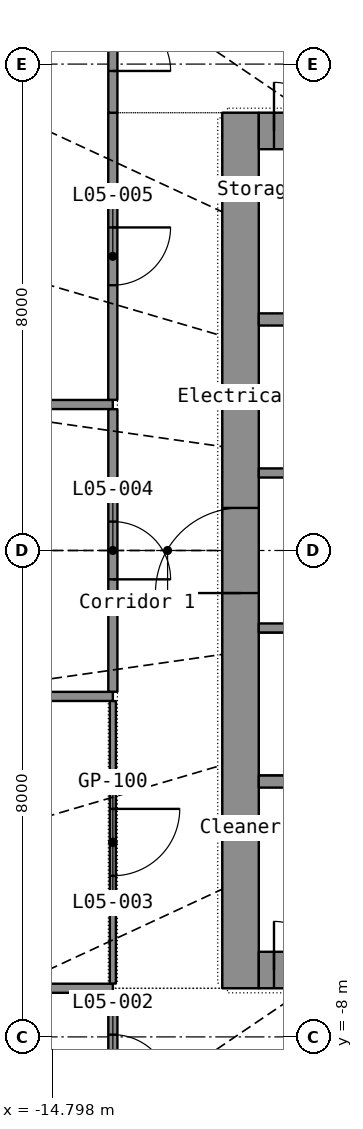
"""IFC4 building model, lengths in metres.
Left out: names, types, materials, properties, quantities, classifications, styles, units other than length and angle.
Written with IfcOpenShell. Run it as: python <this file> out.ifc"""

import sys

from ifc_helpers import new_model, si_unit, direction, frame, frame_2d, origin, place, context, subcontext, project, spatial, rectangle, extrude, element, fill, save


model = new_model("IFC4")
c1 = context("Model", 3, precision=1e-05, world=origin(), true_north=direction((0.0, 1.0)))
c2 = subcontext(c1, "Body", "Model", "MODEL_VIEW")
j1 = project(units=[si_unit("LENGTHUNIT", "METRE"), si_unit("PLANEANGLEUNIT", "RADIAN")], contexts=[c1])
p1 = place(None, origin())
s1 = spatial("IfcSite", under=j1, at=p1, CompositionType="ELEMENT")
p2 = place(p1, origin())
s2 = spatial("IfcBuilding", under=s1, at=p2, CompositionType="ELEMENT")
p3 = place(p2, frame((0.0, 0.0, 28.7)))
s3 = spatial("IfcBuildingStorey", under=s2, at=p3, CompositionType="ELEMENT", Elevation=28.7)
p4 = place(p3, frame((-11.7, -7.2, 0.0), z_axis=(0.0, 0.0, 1.0), x_axis=(0.0, 1.0, 0.0)))
e1 = element("IfcWall", 1, at=p4, inside=s3, PredefinedType="SHEAR", context=c2, shape_type="SweptSolid", body=[
    extrude(rectangle(XDim=14.4, YDim=0.6, at=frame_2d((7.2, 0.0))), origin(), (0.0, 0.0, 1.0), 3.8),
])
p5 = place(p4, frame((6.5, 0.0, 0.0)))
e2 = element("IfcOpeningElement", 2, at=p5, cuts=e1, PredefinedType="OPENING", context=c2, shape_type="SweptSolid", body=[
    extrude(rectangle(XDim=1.4, YDim=2.2, at=frame_2d((0.7, 1.1))), frame((0.0, 0.31, 0.0), z_axis=(0.0, -1.0, 0.0), x_axis=(1.0, 0.0, 0.0)), (0.0, 0.0, 1.0), 0.62),
])
p6 = place(p3, frame((-11.4, -6.9, 0.0), z_axis=(0.0, 0.0, 1.0), x_axis=(1.0, 0.0, 0.0)))
e3 = element("IfcWall", 3, at=p6, inside=s3, PredefinedType="SHEAR", context=c2, shape_type="SweptSolid", body=[
    extrude(rectangle(XDim=22.8, YDim=0.6, at=frame_2d((11.4, 0.0))), origin(), (0.0, 0.0, 1.0), 3.8),
])
p7 = place(p6, frame((1.85, 0.0, 0.0)))
e4 = element("IfcOpeningElement", 4, at=p7, cuts=e3, PredefinedType="OPENING", context=c2, shape_type="SweptSolid", body=[
    extrude(rectangle(XDim=1.1, YDim=2.2, at=frame_2d((0.55, 1.1))), frame((0.0, 0.31, 0.0), z_axis=(0.0, -1.0, 0.0), x_axis=(1.0, 0.0, 0.0)), (0.0, 0.0, 1.0), 0.62),
])
p8 = place(p6, frame((3.85, 0.0, 0.0)))
e5 = element("IfcOpeningElement", 5, at=p8, cuts=e3, PredefinedType="OPENING", context=c2, shape_type="SweptSolid", body=[
    extrude(rectangle(XDim=1.1, YDim=2.2, at=frame_2d((0.55, 1.1))), frame((0.0, 0.31, 0.0), z_axis=(0.0, -1.0, 0.0), x_axis=(1.0, 0.0, 0.0)), (0.0, 0.0, 1.0), 0.62),
])
p9 = place(p6, frame((5.85, 0.0, 0.0)))
e6 = element("IfcOpeningElement", 6, at=p9, cuts=e3, PredefinedType="OPENING", context=c2, shape_type="SweptSolid", body=[
    extrude(rectangle(XDim=1.1, YDim=2.2, at=frame_2d((0.55, 1.1))), frame((0.0, 0.31, 0.0), z_axis=(0.0, -1.0, 0.0), x_axis=(1.0, 0.0, 0.0)), (0.0, 0.0, 1.0), 0.62),
])
p10 = place(p6, frame((7.85, 0.0, 0.0)))
e7 = element("IfcOpeningElement", 7, at=p10, cuts=e3, PredefinedType="OPENING", context=c2, shape_type="SweptSolid", body=[
    extrude(rectangle(XDim=1.1, YDim=2.2, at=frame_2d((0.55, 1.1))), frame((0.0, 0.31, 0.0), z_axis=(0.0, -1.0, 0.0), x_axis=(1.0, 0.0, 0.0)), (0.0, 0.0, 1.0), 0.62),
])
p11 = place(p6, frame((9.85, 0.0, 0.0)))
e8 = element("IfcOpeningElement", 8, at=p11, cuts=e3, PredefinedType="OPENING", context=c2, shape_type="SweptSolid", body=[
    extrude(rectangle(XDim=1.1, YDim=2.2, at=frame_2d((0.55, 1.1))), frame((0.0, 0.31, 0.0), z_axis=(0.0, -1.0, 0.0), x_axis=(1.0, 0.0, 0.0)), (0.0, 0.0, 1.0), 0.62),
])
p12 = place(p6, frame((11.85, 0.0, 0.0)))
e9 = element("IfcOpeningElement", 9, at=p12, cuts=e3, PredefinedType="OPENING", context=c2, shape_type="SweptSolid", body=[
    extrude(rectangle(XDim=1.1, YDim=2.2, at=frame_2d((0.55, 1.1))), frame((0.0, 0.31, 0.0), z_axis=(0.0, -1.0, 0.0), x_axis=(1.0, 0.0, 0.0)), (0.0, 0.0, 1.0), 0.62),
])
p13 = place(p6, frame((13.85, 0.0, 0.0)))
e10 = element("IfcOpeningElement", 10, at=p13, cuts=e3, PredefinedType="OPENING", context=c2, shape_type="SweptSolid", body=[
    extrude(rectangle(XDim=1.1, YDim=2.2, at=frame_2d((0.55, 1.1))), frame((0.0, 0.31, 0.0), z_axis=(0.0, -1.0, 0.0), x_axis=(1.0, 0.0, 0.0)), (0.0, 0.0, 1.0), 0.62),
])
p14 = place(p6, frame((15.85, 0.0, 0.0)))
e11 = element("IfcOpeningElement", 11, at=p14, cuts=e3, PredefinedType="OPENING", context=c2, shape_type="SweptSolid", body=[
    extrude(rectangle(XDim=1.1, YDim=2.2, at=frame_2d((0.55, 1.1))), frame((0.0, 0.31, 0.0), z_axis=(0.0, -1.0, 0.0), x_axis=(1.0, 0.0, 0.0)), (0.0, 0.0, 1.0), 0.62),
])
p15 = place(p6, frame((19.85, 0.0, 0.0)))
e12 = element("IfcOpeningElement", 12, at=p15, cuts=e3, PredefinedType="OPENING", context=c2, shape_type="SweptSolid", body=[
    extrude(rectangle(XDim=1.1, YDim=2.2, at=frame_2d((0.55, 1.1))), frame((0.0, 0.31, 0.0), z_axis=(0.0, -1.0, 0.0), x_axis=(1.0, 0.0, 0.0)), (0.0, 0.0, 1.0), 0.62),
])
p16 = place(p6, frame((0.25, 0.0, 0.0)))
e13 = element("IfcOpeningElement", 13, at=p16, cuts=e3, PredefinedType="OPENING", context=c2, shape_type="SweptSolid", body=[
    extrude(rectangle(XDim=0.8, YDim=2.05, at=frame_2d((0.4, 1.025))), frame((0.0, 0.31, 0.0), z_axis=(0.0, -1.0, 0.0), x_axis=(1.0, 0.0, 0.0)), (0.0, 0.0, 1.0), 0.62),
])
p17 = place(p6, frame((21.75, 0.0, 0.0)))
e14 = element("IfcOpeningElement", 14, at=p17, cuts=e3, PredefinedType="OPENING", context=c2, shape_type="SweptSolid", body=[
    extrude(rectangle(XDim=0.8, YDim=2.05, at=frame_2d((0.4, 1.025))), frame((0.0, 0.31, 0.0), z_axis=(0.0, -1.0, 0.0), x_axis=(1.0, 0.0, 0.0)), (0.0, 0.0, 1.0), 0.62),
])
p18 = place(p3, frame((-11.4, 6.9, 0.0), z_axis=(0.0, 0.0, 1.0), x_axis=(1.0, 0.0, 0.0)))
e15 = element("IfcWall", 15, at=p18, inside=s3, PredefinedType="SHEAR", context=c2, shape_type="SweptSolid", body=[
    extrude(rectangle(XDim=22.8, YDim=0.6, at=frame_2d((11.4, 0.0))), origin(), (0.0, 0.0, 1.0), 3.8),
])
p19 = place(p18, frame((1.85, 0.0, 0.0)))
e16 = element("IfcOpeningElement", 16, at=p19, cuts=e15, PredefinedType="OPENING", context=c2, shape_type="SweptSolid", body=[
    extrude(rectangle(XDim=1.1, YDim=2.2, at=frame_2d((0.55, 1.1))), frame((0.0, 0.31, 0.0), z_axis=(0.0, -1.0, 0.0), x_axis=(1.0, 0.0, 0.0)), (0.0, 0.0, 1.0), 0.62),
])
p20 = place(p18, frame((8.95, 0.0, 0.0)))
e17 = element("IfcOpeningElement", 17, at=p20, cuts=e15, PredefinedType="OPENING", context=c2, shape_type="SweptSolid", body=[
    extrude(rectangle(XDim=0.9, YDim=2.1, at=frame_2d((0.45, 1.05))), frame((0.0, 0.31, 0.0), z_axis=(0.0, -1.0, 0.0), x_axis=(1.0, 0.0, 0.0)), (0.0, 0.0, 1.0), 0.62),
])
p21 = place(p18, frame((16.95, 0.0, 0.0)))
e18 = element("IfcOpeningElement", 18, at=p21, cuts=e15, PredefinedType="OPENING", context=c2, shape_type="SweptSolid", body=[
    extrude(rectangle(XDim=0.9, YDim=2.1, at=frame_2d((0.45, 1.05))), frame((0.0, 0.31, 0.0), z_axis=(0.0, -1.0, 0.0), x_axis=(1.0, 0.0, 0.0)), (0.0, 0.0, 1.0), 0.62),
])
p22 = place(p18, frame((0.25, 0.0, 0.0)))
e19 = element("IfcOpeningElement", 19, at=p22, cuts=e15, PredefinedType="OPENING", context=c2, shape_type="SweptSolid", body=[
    extrude(rectangle(XDim=0.8, YDim=2.05, at=frame_2d((0.4, 1.025))), frame((0.0, 0.31, 0.0), z_axis=(0.0, -1.0, 0.0), x_axis=(1.0, 0.0, 0.0)), (0.0, 0.0, 1.0), 0.62),
])
p23 = place(p18, frame((21.75, 0.0, 0.0)))
e20 = element("IfcOpeningElement", 20, at=p23, cuts=e15, PredefinedType="OPENING", context=c2, shape_type="SweptSolid", body=[
    extrude(rectangle(XDim=0.8, YDim=2.05, at=frame_2d((0.4, 1.025))), frame((0.0, 0.31, 0.0), z_axis=(0.0, -1.0, 0.0), x_axis=(1.0, 0.0, 0.0)), (0.0, 0.0, 1.0), 0.62),
])
for number, where, z_axis, x_axis in (
    (21, (-11.4, -3.8, 0.0), (0.0, 0.0, 1.0), (1.0, 0.0, 0.0)),
    (22, (-11.4, 3.8, 0.0), (0.0, 0.0, 1.0), (1.0, 0.0, 0.0)),
):
    element("IfcWall", number, at=place(p3, frame(where, z_axis=z_axis, x_axis=x_axis)), inside=s3, PredefinedType="SHEAR", context=c2, shape_type="SweptSolid", body=[
        extrude(rectangle(XDim=22.8, YDim=0.2, at=frame_2d((11.4, 0.0))), origin(), (0.0, 0.0, 1.0), 3.8),
    ])
p24 = place(p3, frame((-11.4, -1.275, 0.0), z_axis=(0.0, 0.0, 1.0), x_axis=(1.0, 0.0, 0.0)))
e23 = element("IfcWall", 23, at=p24, inside=s3, PredefinedType="SHEAR", context=c2, shape_type="SweptSolid", body=[
    extrude(rectangle(XDim=8.4, YDim=0.15, at=frame_2d((4.2, 0.0))), origin(), (0.0, 0.0, 1.0), 3.8),
])
p25 = place(p24, frame((5.25, 0.0, 0.0)))
e24 = element("IfcOpeningElement", 24, at=p25, cuts=e23, PredefinedType="OPENING", context=c2, shape_type="SweptSolid", body=[
    extrude(rectangle(XDim=1.1, YDim=2.15, at=frame_2d((0.55, 1.075))), frame((0.0, 0.085, 0.0), z_axis=(0.0, -1.0, 0.0), x_axis=(1.0, 0.0, 0.0)), (0.0, 0.0, 1.0), 0.17),
])
p26 = place(p24, frame((7.05, 0.0, 0.0)))
e25 = element("IfcOpeningElement", 25, at=p26, cuts=e23, PredefinedType="OPENING", context=c2, shape_type="SweptSolid", body=[
    extrude(rectangle(XDim=0.9, YDim=2.1, at=frame_2d((0.45, 1.05))), frame((0.0, 0.085, 0.0), z_axis=(0.0, -1.0, 0.0), x_axis=(1.0, 0.0, 0.0)), (0.0, 0.0, 1.0), 0.17),
])
p27 = place(p3, frame((-11.4, 1.275, 0.0), z_axis=(0.0, 0.0, 1.0), x_axis=(1.0, 0.0, 0.0)))
e26 = element("IfcWall", 26, at=p27, inside=s3, PredefinedType="PARTITIONING", context=c2, shape_type="SweptSolid", body=[
    extrude(rectangle(XDim=8.4, YDim=0.15, at=frame_2d((4.2, 0.0))), origin(), (0.0, 0.0, 1.0), 3.8),
])
p28 = place(p27, frame((0.522, 0.0, 0.0)))
e27 = element("IfcOpeningElement", 27, at=p28, cuts=e26, PredefinedType="OPENING", context=c2, shape_type="SweptSolid", body=[
    extrude(rectangle(XDim=0.9, YDim=2.1, at=frame_2d((0.45, 1.05))), frame((0.0, 0.085, 0.0), z_axis=(0.0, -1.0, 0.0), x_axis=(1.0, 0.0, 0.0)), (0.0, 0.0, 1.0), 0.17),
])
p29 = place(p27, frame((3.208, 0.0, 0.0)))
e28 = element("IfcOpeningElement", 28, at=p29, cuts=e26, PredefinedType="OPENING", context=c2, shape_type="SweptSolid", body=[
    extrude(rectangle(XDim=0.85, YDim=2.1, at=frame_2d((0.425, 1.05))), frame((0.0, 0.085, 0.0), z_axis=(0.0, -1.0, 0.0), x_axis=(1.0, 0.0, 0.0)), (0.0, 0.0, 1.0), 0.17),
])
p30 = place(p27, frame((6.436, 0.0, 0.0)))
e29 = element("IfcOpeningElement", 29, at=p30, cuts=e26, PredefinedType="OPENING", context=c2, shape_type="SweptSolid", body=[
    extrude(rectangle(XDim=0.85, YDim=2.1, at=frame_2d((0.425, 1.05))), frame((0.0, 0.085, 0.0), z_axis=(0.0, -1.0, 0.0), x_axis=(1.0, 0.0, 0.0)), (0.0, 0.0, 1.0), 0.17),
])
p31 = place(p3, frame((-13.8, -2.4, 0.0), z_axis=(0.0, 0.0, 1.0), x_axis=(-1.0, 0.0, 0.0)))
e30 = element("IfcWall", 30, at=p31, inside=s3, PredefinedType="PARTITIONING", context=c2, shape_type="SweptSolid", body=[
    extrude(rectangle(XDim=14.314, YDim=0.15, at=frame_2d((7.157, 0.0))), origin(), (0.0, 0.0, 1.0), 2.8),
])
p32 = place(p3, frame((-13.801, 2.401, 0.0), z_axis=(0.0, 0.0, 1.0), x_axis=(-1.0, 0.0, 0.0)))
e31 = element("IfcWall", 31, at=p32, inside=s3, PredefinedType="PARTITIONING", context=c2, shape_type="SweptSolid", body=[
    extrude(rectangle(XDim=14.312, YDim=0.15, at=frame_2d((7.156, 0.0))), origin(), (0.0, 0.0, 1.0), 2.8),
])
p33 = place(p3, frame((-13.8, -7.2, 0.0), z_axis=(0.0, 0.0, 1.0), x_axis=(-1.0, 0.0, 0.0)))
e32 = element("IfcWall", 32, at=p33, inside=s3, PredefinedType="PARTITIONING", context=c2, shape_type="SweptSolid", body=[
    extrude(rectangle(XDim=13.045, YDim=0.15, at=frame_2d((6.522, 0.0))), origin(), (0.0, 0.0, 1.0), 2.8),
])
p34 = place(p3, frame((-13.8, -2.477, 0.0), z_axis=(0.0, 0.0, 1.0), x_axis=(0.0, -1.0, 0.0)))
e33 = element("IfcWall", 33, at=p34, inside=s3, PredefinedType="PARTITIONING", context=c2, shape_type="SweptSolid", body=[
    extrude(rectangle(XDim=4.646, YDim=0.1, at=frame_2d((2.323, 0.0))), origin(), (0.0, 0.0, 1.0), 2.8),
])
p35 = place(p34, frame((1.773, 0.0, 0.0)))
e34 = element("IfcOpeningElement", 34, at=p35, cuts=e33, PredefinedType="OPENING", context=c2, shape_type="SweptSolid", body=[
    extrude(rectangle(XDim=1.1, YDim=2.2, at=frame_2d((0.55, 1.1))), frame((0.0, 0.06, 0.0), z_axis=(0.0, -1.0, 0.0), x_axis=(1.0, 0.0, 0.0)), (0.0, 0.0, 1.0), 0.12),
])
p36 = place(p3, frame((-13.8, 2.324, 0.0), z_axis=(0.0, 0.0, 1.0), x_axis=(0.0, -1.0, 0.0)))
e35 = element("IfcWall", 35, at=p36, inside=s3, PredefinedType="PARTITIONING", context=c2, shape_type="SweptSolid", body=[
    extrude(rectangle(XDim=4.647, YDim=0.15, at=frame_2d((2.323, 0.0))), origin(), (0.0, 0.0, 1.0), 2.8),
])
p37 = place(p36, frame((1.848, 0.0, 0.0)))
e36 = element("IfcOpeningElement", 36, at=p37, cuts=e35, PredefinedType="OPENING", context=c2, shape_type="SweptSolid", body=[
    extrude(rectangle(XDim=0.95, YDim=2.15, at=frame_2d((0.475, 1.075))), frame((0.0, 0.085, 0.0), z_axis=(0.0, -1.0, 0.0), x_axis=(1.0, 0.0, 0.0)), (0.0, 0.0, 1.0), 0.17),
])
p38 = place(p3, frame((-13.801, 7.199, 0.0), z_axis=(0.0, 0.0, 1.0), x_axis=(0.0, -1.0, 0.0)))
e37 = element("IfcWall", 37, at=p38, inside=s3, PredefinedType="PARTITIONING", context=c2, shape_type="SweptSolid", body=[
    extrude(rectangle(XDim=4.721, YDim=0.15, at=frame_2d((2.36, 0.0))), origin(), (0.0, 0.0, 1.0), 2.8),
])
p39 = place(p38, frame((1.885, 0.0, 0.0)))
e38 = element("IfcOpeningElement", 38, at=p39, cuts=e37, PredefinedType="OPENING", context=c2, shape_type="SweptSolid", body=[
    extrude(rectangle(XDim=0.95, YDim=2.15, at=frame_2d((0.475, 1.075))), frame((0.0, 0.085, 0.0), z_axis=(0.0, -1.0, 0.0), x_axis=(1.0, 0.0, 0.0)), (0.0, 0.0, 1.0), 0.17),
])
p40 = place(p3, frame((-13.8, -7.277, 0.0), z_axis=(0.0, 0.0, 1.0), x_axis=(0.0, -1.0, 0.0)))
e39 = element("IfcWall", 39, at=p40, inside=s3, PredefinedType="PARTITIONING", context=c2, shape_type="SweptSolid", body=[
    extrude(rectangle(XDim=2.322, YDim=0.15, at=frame_2d((1.161, 0.0))), origin(), (0.0, 0.0, 1.0), 2.8),
])
p41 = place(p40, frame((0.686, 0.0, 0.0)))
e40 = element("IfcOpeningElement", 40, at=p41, cuts=e39, PredefinedType="OPENING", context=c2, shape_type="SweptSolid", body=[
    extrude(rectangle(XDim=0.95, YDim=2.15, at=frame_2d((0.475, 1.075))), frame((0.0, 0.085, 0.0), z_axis=(0.0, -1.0, 0.0), x_axis=(1.0, 0.0, 0.0)), (0.0, 0.0, 1.0), 0.17),
])
p42 = place(p3, frame((-13.8, 9.524, 0.0), z_axis=(0.0, 0.0, 1.0), x_axis=(0.0, -1.0, 0.0)))
e41 = element("IfcWall", 41, at=p42, inside=s3, PredefinedType="PARTITIONING", context=c2, shape_type="SweptSolid", body=[
    extrude(rectangle(XDim=2.324, YDim=0.15, at=frame_2d((1.162, 0.0))), origin(), (0.0, 0.0, 1.0), 2.8),
])
p43 = place(p42, frame((0.687, 0.0, 0.0)))
e42 = element("IfcOpeningElement", 42, at=p43, cuts=e41, PredefinedType="OPENING", context=c2, shape_type="SweptSolid", body=[
    extrude(rectangle(XDim=0.95, YDim=2.15, at=frame_2d((0.475, 1.075))), frame((0.0, 0.085, 0.0), z_axis=(0.0, -1.0, 0.0), x_axis=(1.0, 0.0, 0.0)), (0.0, 0.0, 1.0), 0.17),
])
p44 = place(p16, origin())
e43 = element("IfcDoor", 43, at=p44, inside=s3, OperationType="SINGLE_SWING_LEFT", PredefinedType="DOOR", context=c2, shape_type="SweptSolid", body=[
    extrude(rectangle(XDim=0.8, YDim=2.05, at=frame_2d((0.4, 1.025))), frame((0.0, 0.025, 0.0), z_axis=(0.0, -1.0, 0.0), x_axis=(1.0, 0.0, 0.0)), (0.0, 0.0, 1.0), 0.05),
])
fill(e13, e43)
p45 = place(p22, origin())
e44 = element("IfcDoor", 44, at=p45, inside=s3, OperationType="SINGLE_SWING_LEFT", PredefinedType="DOOR", context=c2, shape_type="SweptSolid", body=[
    extrude(rectangle(XDim=0.8, YDim=2.05, at=frame_2d((0.4, 1.025))), frame((0.0, 0.025, 0.0), z_axis=(0.0, -1.0, 0.0), x_axis=(1.0, 0.0, 0.0)), (0.0, 0.0, 1.0), 0.05),
])
fill(e19, e44)
p46 = place(p5, origin())
e45 = element("IfcDoor", 45, at=p46, inside=s3, OperationType="DOUBLE_DOOR_SINGLE_SWING", PredefinedType="DOOR", context=c2, shape_type="SweptSolid", body=[
    extrude(rectangle(XDim=1.4, YDim=2.2, at=frame_2d((0.7, 1.1))), frame((0.0, 0.025, 0.0), z_axis=(0.0, -1.0, 0.0), x_axis=(1.0, 0.0, 0.0)), (0.0, 0.0, 1.0), 0.05),
])
fill(e2, e45)
p47 = place(p41, origin())
e46 = element("IfcDoor", 46, at=p47, inside=s3, OperationType="SINGLE_SWING_RIGHT", PredefinedType="DOOR", context=c2, shape_type="SweptSolid", body=[
    extrude(rectangle(XDim=0.95, YDim=2.15, at=frame_2d((0.475, 1.075))), frame((0.0, 0.025, 0.0), z_axis=(0.0, -1.0, 0.0), x_axis=(1.0, 0.0, 0.0)), (0.0, 0.0, 1.0), 0.05),
])
fill(e40, e46)
p48 = place(p35, origin())
e47 = element("IfcDoor", 47, at=p48, inside=s3, OperationType="SINGLE_SWING_LEFT", PredefinedType="DOOR", context=c2, shape_type="SweptSolid", body=[
    extrude(rectangle(XDim=1.1, YDim=2.2, at=frame_2d((0.55, 1.1))), frame((0.0, 0.025, 0.0), z_axis=(0.0, -1.0, 0.0), x_axis=(1.0, 0.0, 0.0)), (0.0, 0.0, 1.0), 0.05),
])
fill(e34, e47)
p49 = place(p37, origin())
e48 = element("IfcDoor", 48, at=p49, inside=s3, OperationType="SINGLE_SWING_RIGHT", PredefinedType="DOOR", context=c2, shape_type="SweptSolid", body=[
    extrude(rectangle(XDim=0.95, YDim=2.15, at=frame_2d((0.475, 1.075))), frame((0.0, 0.025, 0.0), z_axis=(0.0, -1.0, 0.0), x_axis=(1.0, 0.0, 0.0)), (0.0, 0.0, 1.0), 0.05),
])
fill(e36, e48)
p50 = place(p39, origin())
e49 = element("IfcDoor", 49, at=p50, inside=s3, OperationType="SINGLE_SWING_LEFT", PredefinedType="DOOR", context=c2, shape_type="SweptSolid", body=[
    extrude(rectangle(XDim=0.95, YDim=2.15, at=frame_2d((0.475, 1.075))), frame((0.0, 0.025, 0.0), z_axis=(0.0, -1.0, 0.0), x_axis=(1.0, 0.0, 0.0)), (0.0, 0.0, 1.0), 0.05),
])
fill(e38, e49)
p51 = place(p43, origin())
e50 = element("IfcDoor", 50, at=p51, inside=s3, OperationType="SINGLE_SWING_RIGHT", PredefinedType="DOOR", context=c2, shape_type="SweptSolid", body=[
    extrude(rectangle(XDim=0.95, YDim=2.15, at=frame_2d((0.475, 1.075))), frame((0.0, 0.025, 0.0), z_axis=(0.0, -1.0, 0.0), x_axis=(1.0, 0.0, 0.0)), (0.0, 0.0, 1.0), 0.05),
])
fill(e42, e50)
save(model, sys.argv[1])
